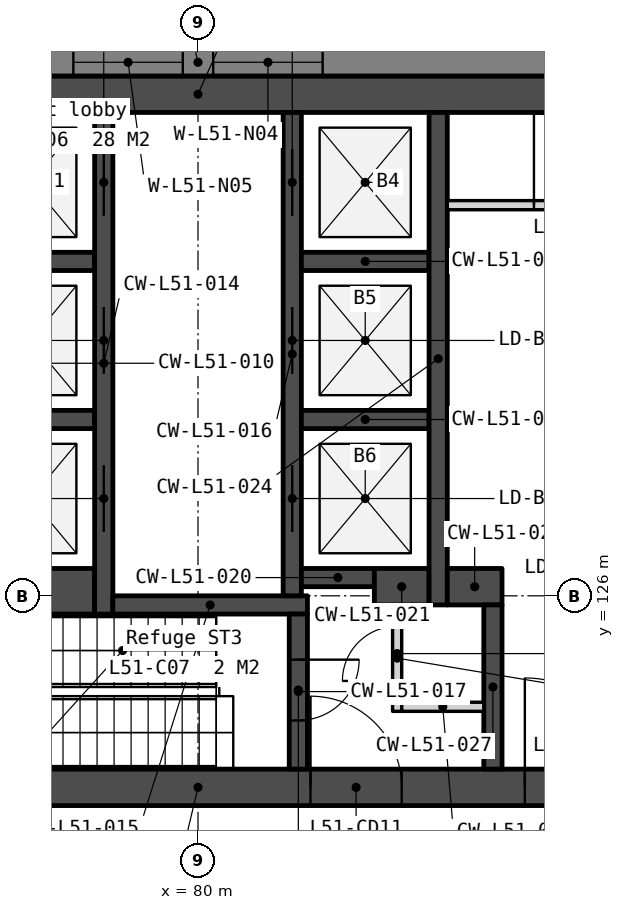
"""IFC4 building model, lengths in metres.
Left out: names, types, materials, properties, quantities, classifications, styles, units other than length and angle.
Written with IfcOpenShell. Run it as: python <this file> out.ifc"""

import sys

from ifc_helpers import new_model, si_unit, direction, frame, frame_2d, origin, place, context, subcontext, project, spatial, polyline, rectangle, outline, extrude, element, fill, save


model = new_model("IFC4")
c1 = context("Model", 3, precision=1e-05, world=origin(), true_north=direction((0.0, 1.0)))
c2 = subcontext(c1, "Body", "Model", "MODEL_VIEW")
j1 = project(units=[si_unit("LENGTHUNIT", "METRE"), si_unit("PLANEANGLEUNIT", "RADIAN")], contexts=[c1])
p1 = place(None, origin())
s1 = spatial("IfcSite", under=j1, at=p1, CompositionType="ELEMENT")
p2 = place(p1, origin())
s2 = spatial("IfcBuilding", under=s1, at=p2, CompositionType="ELEMENT")
p3 = place(p2, frame((0.0, 0.0, 203.6)))
s3 = spatial("IfcBuildingStorey", under=s2, at=p3, CompositionType="ELEMENT", Elevation=203.6)
p4 = place(p3, frame((69.0, 134.25, 0.0), z_axis=(0.0, 0.0, 1.0), x_axis=(1.0, 0.0, 0.0)))
e1 = element("IfcWall", 1, at=p4, inside=s3, PredefinedType="SOLIDWALL", context=c2, shape_type="SweptSolid", body=[
    extrude(rectangle(XDim=22.0, YDim=0.6, at=frame_2d((11.0, 0.0))), origin(), (0.0, 0.0, 1.0), 3.75),
])
p5 = place(p3, frame((69.0, 122.85, 0.0), z_axis=(0.0, 0.0, 1.0), x_axis=(1.0, 0.0, 0.0)))
e2 = element("IfcWall", 2, at=p5, inside=s3, PredefinedType="SOLIDWALL", context=c2, shape_type="SweptSolid", body=[
    extrude(rectangle(XDim=22.0, YDim=0.6, at=frame_2d((11.0, 0.0))), origin(), (0.0, 0.0, 1.0), 3.75),
])
p6 = place(p5, frame((16.375, 0.0, 0.0)))
e3 = element("IfcOpeningElement", 3, at=p6, cuts=e2, PredefinedType="OPENING", context=c2, shape_type="SweptSolid", body=[
    extrude(rectangle(XDim=1.8, YDim=2.1, at=frame_2d((0.9, 1.05))), frame((0.0, 0.31, 0.0), z_axis=(0.0, -1.0, 0.0), x_axis=(1.0, 0.0, 0.0)), (0.0, 0.0, 1.0), 0.62),
])
p7 = place(p5, frame((3.825, 0.0, 0.0)))
e4 = element("IfcOpeningElement", 4, at=p7, cuts=e2, PredefinedType="OPENING", context=c2, shape_type="SweptSolid", body=[
    extrude(rectangle(XDim=1.8, YDim=2.1, at=frame_2d((0.9, 1.05))), frame((0.0, 0.31, 0.0), z_axis=(0.0, -1.0, 0.0), x_axis=(1.0, 0.0, 0.0)), (0.0, 0.0, 1.0), 0.62),
])
p8 = place(p5, frame((12.85, 0.0, 0.0)))
e5 = element("IfcOpeningElement", 5, at=p8, cuts=e2, PredefinedType="OPENING", context=c2, shape_type="SweptSolid", body=[
    extrude(rectangle(XDim=1.5, YDim=2.1, at=frame_2d((0.75, 1.05))), frame((0.0, 0.31, 0.0), z_axis=(0.0, -1.0, 0.0), x_axis=(1.0, 0.0, 0.0)), (0.0, 0.0, 1.0), 0.62),
])
for number, where, z_axis, x_axis in (
    (6, (76.2, 131.5, 0.0), (0.0, 0.0, 1.0), (1.0, 0.0, 0.0)),
    (7, (76.2, 128.9, 0.0), (0.0, 0.0, 1.0), (1.0, 0.0, 0.0)),
):
    element("IfcWall", number, at=place(p3, frame(where, z_axis=z_axis, x_axis=x_axis)), inside=s3, PredefinedType="SOLIDWALL", context=c2, shape_type="SweptSolid", body=[
        extrude(rectangle(XDim=2.1, YDim=0.3, at=frame_2d((1.05, 0.0))), origin(), (0.0, 0.0, 1.0), 3.75),
    ])
p9 = place(p3, frame((76.2, 126.075, 0.0), z_axis=(0.0, 0.0, 1.0), x_axis=(1.0, 0.0, 0.0)))
e8 = element("IfcWall", 8, at=p9, inside=s3, PredefinedType="SOLIDWALL", context=c2, shape_type="SweptSolid", body=[
    extrude(rectangle(XDim=2.1, YDim=0.75, at=frame_2d((1.05, 0.0))), origin(), (0.0, 0.0, 1.0), 3.75),
])
p10 = place(p3, frame((78.45, 133.95, 0.0), z_axis=(0.0, 0.0, 1.0), x_axis=(0.0, -1.0, 0.0)))
e9 = element("IfcWall", 9, at=p10, inside=s3, PredefinedType="SOLIDWALL", context=c2, shape_type="SweptSolid", body=[
    extrude(rectangle(XDim=8.25, YDim=0.3, at=frame_2d((4.125, 0.0))), origin(), (0.0, 0.0, 1.0), 3.75),
])
p11 = place(p10, frame((0.6, 0.0, 0.0)))
e10 = element("IfcOpeningElement", 10, at=p11, cuts=e9, PredefinedType="OPENING", context=c2, shape_type="SweptSolid", body=[
    extrude(rectangle(XDim=1.1, YDim=2.1, at=frame_2d((0.55, 1.05))), frame((0.0, 0.16, 0.0), z_axis=(0.0, -1.0, 0.0), x_axis=(1.0, 0.0, 0.0)), (0.0, 0.0, 1.0), 0.32),
])
p12 = place(p10, frame((3.2, 0.0, 0.0)))
e11 = element("IfcOpeningElement", 11, at=p12, cuts=e9, PredefinedType="OPENING", context=c2, shape_type="SweptSolid", body=[
    extrude(rectangle(XDim=1.1, YDim=2.1, at=frame_2d((0.55, 1.05))), frame((0.0, 0.16, 0.0), z_axis=(0.0, -1.0, 0.0), x_axis=(1.0, 0.0, 0.0)), (0.0, 0.0, 1.0), 0.32),
])
p13 = place(p10, frame((5.8, 0.0, 0.0)))
e12 = element("IfcOpeningElement", 12, at=p13, cuts=e9, PredefinedType="OPENING", context=c2, shape_type="SweptSolid", body=[
    extrude(rectangle(XDim=1.1, YDim=2.1, at=frame_2d((0.55, 1.05))), frame((0.0, 0.16, 0.0), z_axis=(0.0, -1.0, 0.0), x_axis=(1.0, 0.0, 0.0)), (0.0, 0.0, 1.0), 0.32),
])
p14 = place(p3, frame((78.6, 125.85, 0.0), z_axis=(0.0, 0.0, 1.0), x_axis=(1.0, 0.0, 0.0)))
e13 = element("IfcWall", 13, at=p14, inside=s3, PredefinedType="SOLIDWALL", context=c2, shape_type="SweptSolid", body=[
    extrude(rectangle(XDim=3.2, YDim=0.3, at=frame_2d((1.6, 0.0))), origin(), (0.0, 0.0, 1.0), 3.75),
])
p15 = place(p3, frame((81.55, 133.95, 0.0), z_axis=(0.0, 0.0, 1.0), x_axis=(0.0, -1.0, 0.0)))
e14 = element("IfcWall", 14, at=p15, inside=s3, PredefinedType="SOLIDWALL", context=c2, shape_type="SweptSolid", body=[
    extrude(rectangle(XDim=7.95, YDim=0.3, at=frame_2d((3.975, 0.0))), origin(), (0.0, 0.0, 1.0), 3.75),
])
p16 = place(p15, frame((0.6, 0.0, 0.0)))
e15 = element("IfcOpeningElement", 15, at=p16, cuts=e14, PredefinedType="OPENING", context=c2, shape_type="SweptSolid", body=[
    extrude(rectangle(XDim=1.1, YDim=2.1, at=frame_2d((0.55, 1.05))), frame((0.0, 0.16, 0.0), z_axis=(0.0, -1.0, 0.0), x_axis=(1.0, 0.0, 0.0)), (0.0, 0.0, 1.0), 0.32),
])
p17 = place(p15, frame((3.2, 0.0, 0.0)))
e16 = element("IfcOpeningElement", 16, at=p17, cuts=e14, PredefinedType="OPENING", context=c2, shape_type="SweptSolid", body=[
    extrude(rectangle(XDim=1.1, YDim=2.1, at=frame_2d((0.55, 1.05))), frame((0.0, 0.16, 0.0), z_axis=(0.0, -1.0, 0.0), x_axis=(1.0, 0.0, 0.0)), (0.0, 0.0, 1.0), 0.32),
])
p18 = place(p15, frame((5.8, 0.0, 0.0)))
e17 = element("IfcOpeningElement", 17, at=p18, cuts=e14, PredefinedType="OPENING", context=c2, shape_type="SweptSolid", body=[
    extrude(rectangle(XDim=1.1, YDim=2.1, at=frame_2d((0.55, 1.05))), frame((0.0, 0.16, 0.0), z_axis=(0.0, -1.0, 0.0), x_axis=(1.0, 0.0, 0.0)), (0.0, 0.0, 1.0), 0.32),
])
p19 = place(p3, frame((81.65, 125.7, 0.0), z_axis=(0.0, 0.0, 1.0), x_axis=(0.0, -1.0, 0.0)))
e18 = element("IfcWall", 18, at=p19, inside=s3, PredefinedType="SOLIDWALL", context=c2, shape_type="SweptSolid", body=[
    extrude(rectangle(XDim=2.55, YDim=0.3, at=frame_2d((1.275, 0.0))), origin(), (0.0, 0.0, 1.0), 3.75),
])
p20 = place(p19, frame((0.75, 0.0, 0.0)))
e19 = element("IfcOpeningElement", 19, at=p20, cuts=e18, PredefinedType="OPENING", context=c2, shape_type="SweptSolid", body=[
    extrude(rectangle(XDim=1.0, YDim=2.1, at=frame_2d((0.5, 1.05))), frame((0.0, 0.16, 0.0), z_axis=(0.0, -1.0, 0.0), x_axis=(1.0, 0.0, 0.0)), (0.0, 0.0, 1.0), 0.32),
])
for number, where, z_axis, x_axis in (
    (20, (81.7, 131.5, 0.0), (0.0, 0.0, 1.0), (1.0, 0.0, 0.0)),
    (21, (81.7, 128.9, 0.0), (0.0, 0.0, 1.0), (1.0, 0.0, 0.0)),
):
    element("IfcWall", number, at=place(p3, frame(where, z_axis=z_axis, x_axis=x_axis)), inside=s3, PredefinedType="SOLIDWALL", context=c2, shape_type="SweptSolid", body=[
        extrude(rectangle(XDim=2.1, YDim=0.3, at=frame_2d((1.05, 0.0))), origin(), (0.0, 0.0, 1.0), 3.75),
    ])
p21 = place(p3, frame((81.7, 126.3, 0.0), z_axis=(0.0, 0.0, 1.0), x_axis=(1.0, 0.0, 0.0)))
e22 = element("IfcWall", 22, at=p21, inside=s3, PredefinedType="SOLIDWALL", context=c2, shape_type="SweptSolid", body=[
    extrude(rectangle(XDim=1.2, YDim=0.3, at=frame_2d((0.6, 0.0))), origin(), (0.0, 0.0, 1.0), 3.75),
])
p22 = place(p3, frame((82.9, 126.15, 0.0), z_axis=(0.0, 0.0, 1.0), x_axis=(1.0, 0.0, 0.0)))
e23 = element("IfcWall", 23, at=p22, inside=s3, PredefinedType="SOLIDWALL", context=c2, shape_type="SweptSolid", body=[
    extrude(rectangle(XDim=0.9, YDim=0.6, at=frame_2d((0.45, 0.0))), origin(), (0.0, 0.0, 1.0), 3.75),
])
p23 = place(p3, frame((83.275, 125.85, 0.0), z_axis=(0.0, 0.0, 1.0), x_axis=(0.0, -1.0, 0.0)))
e24 = element("IfcWall", 24, at=p23, inside=s3, PredefinedType="PARTITIONING", context=c2, shape_type="SweptSolid", body=[
    extrude(rectangle(XDim=1.75, YDim=0.15, at=frame_2d((0.875, 0.0))), origin(), (0.0, 0.0, 1.0), 3.75),
])
p24 = place(p23, frame((0.35, 0.0, 0.0)))
e25 = element("IfcOpeningElement", 25, at=p24, cuts=e24, PredefinedType="OPENING", context=c2, shape_type="SweptSolid", body=[
    extrude(rectangle(XDim=0.9, YDim=2.1, at=frame_2d((0.45, 1.05))), frame((0.0, 0.085, 0.0), z_axis=(0.0, -1.0, 0.0), x_axis=(1.0, 0.0, 0.0)), (0.0, 0.0, 1.0), 0.17),
])
p25 = place(p3, frame((83.35, 124.175, 0.0), z_axis=(0.0, 0.0, 1.0), x_axis=(1.0, 0.0, 0.0)))
e26 = element("IfcWall", 26, at=p25, inside=s3, PredefinedType="PARTITIONING", context=c2, shape_type="SweptSolid", body=[
    extrude(rectangle(XDim=1.35, YDim=0.15, at=frame_2d((0.675, 0.0))), origin(), (0.0, 0.0, 1.0), 3.75),
])
p26 = place(p3, frame((83.95, 133.95, 0.0), z_axis=(0.0, 0.0, 1.0), x_axis=(0.0, -1.0, 0.0)))
e27 = element("IfcWall", 27, at=p26, inside=s3, PredefinedType="SOLIDWALL", context=c2, shape_type="SweptSolid", body=[
    extrude(rectangle(XDim=8.1, YDim=0.3, at=frame_2d((4.05, 0.0))), origin(), (0.0, 0.0, 1.0), 3.75),
])
p27 = place(p3, frame((84.1, 132.425, 0.0), z_axis=(0.0, 0.0, 1.0), x_axis=(1.0, 0.0, 0.0)))
e28 = element("IfcWall", 28, at=p27, inside=s3, PredefinedType="PARTITIONING", context=c2, shape_type="SweptSolid", body=[
    extrude(rectangle(XDim=3.45, YDim=0.15, at=frame_2d((1.725, 0.0))), origin(), (0.0, 0.0, 1.0), 3.75),
])
p28 = place(p27, frame((1.425, 0.0, 0.0)))
e29 = element("IfcOpeningElement", 29, at=p28, cuts=e28, PredefinedType="OPENING", context=c2, shape_type="SweptSolid", body=[
    extrude(rectangle(XDim=1.5, YDim=2.1, at=frame_2d((0.75, 1.05))), frame((0.0, 0.085, 0.0), z_axis=(0.0, -1.0, 0.0), x_axis=(1.0, 0.0, 0.0)), (0.0, 0.0, 1.0), 0.17),
])
p29 = place(p3, frame((84.1, 126.15, 0.0), z_axis=(0.0, 0.0, 1.0), x_axis=(1.0, 0.0, 0.0)))
e30 = element("IfcWall", 30, at=p29, inside=s3, PredefinedType="SOLIDWALL", context=c2, shape_type="SweptSolid", body=[
    extrude(rectangle(XDim=0.9, YDim=0.6, at=frame_2d((0.45, 0.0))), origin(), (0.0, 0.0, 1.0), 3.75),
])
p30 = place(p3, frame((84.85, 125.85, 0.0), z_axis=(0.0, 0.0, 1.0), x_axis=(0.0, -1.0, 0.0)))
e31 = element("IfcWall", 31, at=p30, inside=s3, PredefinedType="SOLIDWALL", context=c2, shape_type="SweptSolid", body=[
    extrude(rectangle(XDim=2.7, YDim=0.3, at=frame_2d((1.35, 0.0))), origin(), (0.0, 0.0, 1.0), 3.75),
])
p31 = place(p3, frame((99.365, 134.775, -0.15), z_axis=(0.0, 0.0, 1.0), x_axis=(-1.0, 0.0, 0.0)))
e32 = element("IfcWall", 32, at=p31, inside=s3, PredefinedType="SOLIDWALL", context=c2, shape_type="SweptSolid", body=[
    extrude(outline(polyline([(38.729, 0.0), (38.729, 3.9), (0.0, 3.9), (0.0, 0.0), (38.729, 0.0)])), frame((0.0, 0.225, 0.0), z_axis=(0.0, -1.0, 0.0), x_axis=(1.0, 0.0, 0.0)), (0.0, 0.0, 1.0), 0.45),
])
p32 = place(p31, frame((0.807, 0.0, 0.95)))
e33 = element("IfcOpeningElement", 33, at=p32, cuts=e32, PredefinedType="OPENING", context=c2, shape_type="SweptSolid", body=[
    extrude(rectangle(XDim=1.2, YDim=2.2, at=frame_2d((0.6, 1.1))), frame((0.0, 0.235, 0.0), z_axis=(0.0, -1.0, 0.0), x_axis=(1.0, 0.0, 0.0)), (0.0, 0.0, 1.0), 0.47),
])
p33 = place(p31, frame((7.632, 0.0, 0.95)))
e34 = element("IfcOpeningElement", 34, at=p33, cuts=e32, PredefinedType="OPENING", context=c2, shape_type="SweptSolid", body=[
    extrude(rectangle(XDim=1.8, YDim=2.2, at=frame_2d((0.9, 1.1))), frame((0.0, 0.235, 0.0), z_axis=(0.0, -1.0, 0.0), x_axis=(1.0, 0.0, 0.0)), (0.0, 0.0, 1.0), 0.47),
])
p34 = place(p31, frame((9.932, 0.0, 0.95)))
e35 = element("IfcOpeningElement", 35, at=p34, cuts=e32, PredefinedType="OPENING", context=c2, shape_type="SweptSolid", body=[
    extrude(rectangle(XDim=1.8, YDim=2.2, at=frame_2d((0.9, 1.1))), frame((0.0, 0.235, 0.0), z_axis=(0.0, -1.0, 0.0), x_axis=(1.0, 0.0, 0.0)), (0.0, 0.0, 1.0), 0.47),
])
p35 = place(p31, frame((17.315, 0.0, 0.95)))
e36 = element("IfcOpeningElement", 36, at=p35, cuts=e32, PredefinedType="OPENING", context=c2, shape_type="SweptSolid", body=[
    extrude(rectangle(XDim=1.8, YDim=2.2, at=frame_2d((0.9, 1.1))), frame((0.0, 0.235, 0.0), z_axis=(0.0, -1.0, 0.0), x_axis=(1.0, 0.0, 0.0)), (0.0, 0.0, 1.0), 0.47),
])
p36 = place(p31, frame((19.615, 0.0, 0.95)))
e37 = element("IfcOpeningElement", 37, at=p36, cuts=e32, PredefinedType="OPENING", context=c2, shape_type="SweptSolid", body=[
    extrude(rectangle(XDim=1.8, YDim=2.2, at=frame_2d((0.9, 1.1))), frame((0.0, 0.235, 0.0), z_axis=(0.0, -1.0, 0.0), x_axis=(1.0, 0.0, 0.0)), (0.0, 0.0, 1.0), 0.47),
])
p37 = place(p31, frame((26.997, 0.0, 0.95)))
e38 = element("IfcOpeningElement", 38, at=p37, cuts=e32, PredefinedType="OPENING", context=c2, shape_type="SweptSolid", body=[
    extrude(rectangle(XDim=1.8, YDim=2.2, at=frame_2d((0.9, 1.1))), frame((0.0, 0.235, 0.0), z_axis=(0.0, -1.0, 0.0), x_axis=(1.0, 0.0, 0.0)), (0.0, 0.0, 1.0), 0.47),
])
p38 = place(p31, frame((29.297, 0.0, 0.95)))
e39 = element("IfcOpeningElement", 39, at=p38, cuts=e32, PredefinedType="OPENING", context=c2, shape_type="SweptSolid", body=[
    extrude(rectangle(XDim=1.8, YDim=2.2, at=frame_2d((0.9, 1.1))), frame((0.0, 0.235, 0.0), z_axis=(0.0, -1.0, 0.0), x_axis=(1.0, 0.0, 0.0)), (0.0, 0.0, 1.0), 0.47),
])
p39 = place(p31, frame((36.722, 0.0, 0.95)))
e40 = element("IfcOpeningElement", 40, at=p39, cuts=e32, PredefinedType="OPENING", context=c2, shape_type="SweptSolid", body=[
    extrude(rectangle(XDim=1.2, YDim=2.2, at=frame_2d((0.6, 1.1))), frame((0.0, 0.235, 0.0), z_axis=(0.0, -1.0, 0.0), x_axis=(1.0, 0.0, 0.0)), (0.0, 0.0, 1.0), 0.47),
])
p40 = place(p3, frame((81.505, 98.627, -0.15), z_axis=(0.0, 0.0, 1.0), x_axis=(0.500002199942, 0.866024133644, 0.0)))
e41 = element("IfcWall", 41, at=p40, inside=s3, PredefinedType="SOLIDWALL", context=c2, shape_type="SweptSolid", body=[
    extrude(outline(polyline([(38.729, 0.0), (38.729, 3.9), (0.0, 3.9), (0.0, 0.0), (38.729, 0.0)])), frame((0.0, 0.225, 0.0), z_axis=(0.0, -1.0, 0.0), x_axis=(1.0, 0.0, 0.0)), (0.0, 0.0, 1.0), 0.45),
])
p41 = place(p40, frame((0.807, 0.0, 0.95)))
e42 = element("IfcOpeningElement", 42, at=p41, cuts=e41, PredefinedType="OPENING", context=c2, shape_type="SweptSolid", body=[
    extrude(rectangle(XDim=1.2, YDim=2.2, at=frame_2d((0.6, 1.1))), frame((0.0, 0.235, 0.0), z_axis=(0.0, -1.0, 0.0), x_axis=(1.0, 0.0, 0.0)), (0.0, 0.0, 1.0), 0.47),
])
p42 = place(p40, frame((7.632, 0.0, 0.95)))
e43 = element("IfcOpeningElement", 43, at=p42, cuts=e41, PredefinedType="OPENING", context=c2, shape_type="SweptSolid", body=[
    extrude(rectangle(XDim=1.8, YDim=2.2, at=frame_2d((0.9, 1.1))), frame((0.0, 0.235, 0.0), z_axis=(0.0, -1.0, 0.0), x_axis=(1.0, 0.0, 0.0)), (0.0, 0.0, 1.0), 0.47),
])
p43 = place(p40, frame((9.932, 0.0, 0.95)))
e44 = element("IfcOpeningElement", 44, at=p43, cuts=e41, PredefinedType="OPENING", context=c2, shape_type="SweptSolid", body=[
    extrude(rectangle(XDim=1.8, YDim=2.2, at=frame_2d((0.9, 1.1))), frame((0.0, 0.235, 0.0), z_axis=(0.0, -1.0, 0.0), x_axis=(1.0, 0.0, 0.0)), (0.0, 0.0, 1.0), 0.47),
])
p44 = place(p40, frame((17.315, 0.0, 0.95)))
e45 = element("IfcOpeningElement", 45, at=p44, cuts=e41, PredefinedType="OPENING", context=c2, shape_type="SweptSolid", body=[
    extrude(rectangle(XDim=1.8, YDim=2.2, at=frame_2d((0.9, 1.1))), frame((0.0, 0.235, 0.0), z_axis=(0.0, -1.0, 0.0), x_axis=(1.0, 0.0, 0.0)), (0.0, 0.0, 1.0), 0.47),
])
p45 = place(p40, frame((19.615, 0.0, 0.95)))
e46 = element("IfcOpeningElement", 46, at=p45, cuts=e41, PredefinedType="OPENING", context=c2, shape_type="SweptSolid", body=[
    extrude(rectangle(XDim=1.8, YDim=2.2, at=frame_2d((0.9, 1.1))), frame((0.0, 0.235, 0.0), z_axis=(0.0, -1.0, 0.0), x_axis=(1.0, 0.0, 0.0)), (0.0, 0.0, 1.0), 0.47),
])
p46 = place(p40, frame((26.997, 0.0, 0.95)))
e47 = element("IfcOpeningElement", 47, at=p46, cuts=e41, PredefinedType="OPENING", context=c2, shape_type="SweptSolid", body=[
    extrude(rectangle(XDim=1.8, YDim=2.2, at=frame_2d((0.9, 1.1))), frame((0.0, 0.235, 0.0), z_axis=(0.0, -1.0, 0.0), x_axis=(1.0, 0.0, 0.0)), (0.0, 0.0, 1.0), 0.47),
])
p47 = place(p40, frame((29.297, 0.0, 0.95)))
e48 = element("IfcOpeningElement", 48, at=p47, cuts=e41, PredefinedType="OPENING", context=c2, shape_type="SweptSolid", body=[
    extrude(rectangle(XDim=1.8, YDim=2.2, at=frame_2d((0.9, 1.1))), frame((0.0, 0.235, 0.0), z_axis=(0.0, -1.0, 0.0), x_axis=(1.0, 0.0, 0.0)), (0.0, 0.0, 1.0), 0.47),
])
p48 = place(p40, frame((36.722, 0.0, 0.95)))
e49 = element("IfcOpeningElement", 49, at=p48, cuts=e41, PredefinedType="OPENING", context=c2, shape_type="SweptSolid", body=[
    extrude(rectangle(XDim=1.2, YDim=2.2, at=frame_2d((0.6, 1.1))), frame((0.0, 0.235, 0.0), z_axis=(0.0, -1.0, 0.0), x_axis=(1.0, 0.0, 0.0)), (0.0, 0.0, 1.0), 0.47),
])
p49 = place(p11, origin())
e50 = element("IfcDoor", 50, at=p49, inside=s3, OperationType="SLIDING_TO_RIGHT", PredefinedType="DOOR", context=c2, shape_type="SweptSolid", body=[
    extrude(rectangle(XDim=1.1, YDim=2.1, at=frame_2d((0.55, 1.05))), frame((0.0, 0.025, 0.0), z_axis=(0.0, -1.0, 0.0), x_axis=(1.0, 0.0, 0.0)), (0.0, 0.0, 1.0), 0.05),
])
fill(e10, e50)
p50 = place(p12, origin())
e51 = element("IfcDoor", 51, at=p50, inside=s3, OperationType="SLIDING_TO_RIGHT", PredefinedType="DOOR", context=c2, shape_type="SweptSolid", body=[
    extrude(rectangle(XDim=1.1, YDim=2.1, at=frame_2d((0.55, 1.05))), frame((0.0, 0.025, 0.0), z_axis=(0.0, -1.0, 0.0), x_axis=(1.0, 0.0, 0.0)), (0.0, 0.0, 1.0), 0.05),
])
fill(e11, e51)
p51 = place(p13, origin())
e52 = element("IfcDoor", 52, at=p51, inside=s3, OperationType="SLIDING_TO_RIGHT", PredefinedType="DOOR", context=c2, shape_type="SweptSolid", body=[
    extrude(rectangle(XDim=1.1, YDim=2.1, at=frame_2d((0.55, 1.05))), frame((0.0, 0.025, 0.0), z_axis=(0.0, -1.0, 0.0), x_axis=(1.0, 0.0, 0.0)), (0.0, 0.0, 1.0), 0.05),
])
fill(e12, e52)
p52 = place(p16, origin())
e53 = element("IfcDoor", 53, at=p52, inside=s3, OperationType="SLIDING_TO_LEFT", PredefinedType="DOOR", context=c2, shape_type="SweptSolid", body=[
    extrude(rectangle(XDim=1.1, YDim=2.1, at=frame_2d((0.55, 1.05))), frame((0.0, 0.025, 0.0), z_axis=(0.0, -1.0, 0.0), x_axis=(1.0, 0.0, 0.0)), (0.0, 0.0, 1.0), 0.05),
])
fill(e15, e53)
p53 = place(p17, origin())
e54 = element("IfcDoor", 54, at=p53, inside=s3, OperationType="SLIDING_TO_LEFT", PredefinedType="DOOR", context=c2, shape_type="SweptSolid", body=[
    extrude(rectangle(XDim=1.1, YDim=2.1, at=frame_2d((0.55, 1.05))), frame((0.0, 0.025, 0.0), z_axis=(0.0, -1.0, 0.0), x_axis=(1.0, 0.0, 0.0)), (0.0, 0.0, 1.0), 0.05),
])
fill(e16, e54)
p54 = place(p18, origin())
e55 = element("IfcDoor", 55, at=p54, inside=s3, OperationType="SLIDING_TO_LEFT", PredefinedType="DOOR", context=c2, shape_type="SweptSolid", body=[
    extrude(rectangle(XDim=1.1, YDim=2.1, at=frame_2d((0.55, 1.05))), frame((0.0, 0.025, 0.0), z_axis=(0.0, -1.0, 0.0), x_axis=(1.0, 0.0, 0.0)), (0.0, 0.0, 1.0), 0.05),
])
fill(e17, e55)
p55 = place(p6, origin())
e56 = element("IfcDoor", 56, at=p55, inside=s3, OperationType="DOUBLE_DOOR_DOUBLE_SWING", PredefinedType="DOOR", context=c2, shape_type="SweptSolid", body=[
    extrude(rectangle(XDim=1.8, YDim=2.1, at=frame_2d((0.9, 1.05))), frame((0.0, 0.025, 0.0), z_axis=(0.0, -1.0, 0.0), x_axis=(1.0, 0.0, 0.0)), (0.0, 0.0, 1.0), 0.05),
])
fill(e3, e56)
p56 = place(p8, origin())
e57 = element("IfcDoor", 57, at=p56, inside=s3, OperationType="DOUBLE_DOOR_DOUBLE_SWING", PredefinedType="DOOR", context=c2, shape_type="SweptSolid", body=[
    extrude(rectangle(XDim=1.5, YDim=2.1, at=frame_2d((0.75, 1.05))), frame((0.0, 0.025, 0.0), z_axis=(0.0, -1.0, 0.0), x_axis=(1.0, 0.0, 0.0)), (0.0, 0.0, 1.0), 0.05),
])
fill(e5, e57)
p57 = place(p24, origin())
e58 = element("IfcDoor", 58, at=p57, inside=s3, OperationType="SINGLE_SWING_RIGHT", PredefinedType="DOOR", context=c2, shape_type="SweptSolid", body=[
    extrude(rectangle(XDim=0.9, YDim=2.1, at=frame_2d((0.45, 1.05))), frame((0.0, 0.025, 0.0), z_axis=(0.0, -1.0, 0.0), x_axis=(1.0, 0.0, 0.0)), (0.0, 0.0, 1.0), 0.05),
])
fill(e25, e58)
p58 = place(p28, origin())
e59 = element("IfcDoor", 59, at=p58, inside=s3, OperationType="DOUBLE_DOOR_DOUBLE_SWING", PredefinedType="DOOR", context=c2, shape_type="SweptSolid", body=[
    extrude(rectangle(XDim=1.5, YDim=2.1, at=frame_2d((0.75, 1.05))), frame((0.0, 0.025, 0.0), z_axis=(0.0, -1.0, 0.0), x_axis=(1.0, 0.0, 0.0)), (0.0, 0.0, 1.0), 0.05),
])
fill(e29, e59)
p59 = place(p20, origin())
e60 = element("IfcDoor", 60, at=p59, inside=s3, OperationType="SINGLE_SWING_LEFT", PredefinedType="DOOR", context=c2, shape_type="SweptSolid", body=[
    extrude(rectangle(XDim=1.0, YDim=2.1, at=frame_2d((0.5, 1.05))), frame((0.0, 0.025, 0.0), z_axis=(0.0, -1.0, 0.0), x_axis=(1.0, 0.0, 0.0)), (0.0, 0.0, 1.0), 0.05),
])
fill(e19, e60)
p60 = place(p35, origin())
e61 = element("IfcWindow", 61, at=p60, inside=s3, PartitioningType="SINGLE_PANEL", PredefinedType="WINDOW", context=c2, shape_type="SweptSolid", body=[
    extrude(rectangle(XDim=1.8, YDim=2.2, at=frame_2d((0.9, 1.1))), frame((0.0, 0.03, 0.0), z_axis=(0.0, -1.0, 0.0), x_axis=(1.0, 0.0, 0.0)), (0.0, 0.0, 1.0), 0.06),
])
fill(e36, e61)
p61 = place(p36, origin())
e62 = element("IfcWindow", 62, at=p61, inside=s3, PartitioningType="SINGLE_PANEL", PredefinedType="WINDOW", context=c2, shape_type="SweptSolid", body=[
    extrude(rectangle(XDim=1.8, YDim=2.2, at=frame_2d((0.9, 1.1))), frame((0.0, 0.03, 0.0), z_axis=(0.0, -1.0, 0.0), x_axis=(1.0, 0.0, 0.0)), (0.0, 0.0, 1.0), 0.06),
])
fill(e37, e62)
save(model, sys.argv[1])
